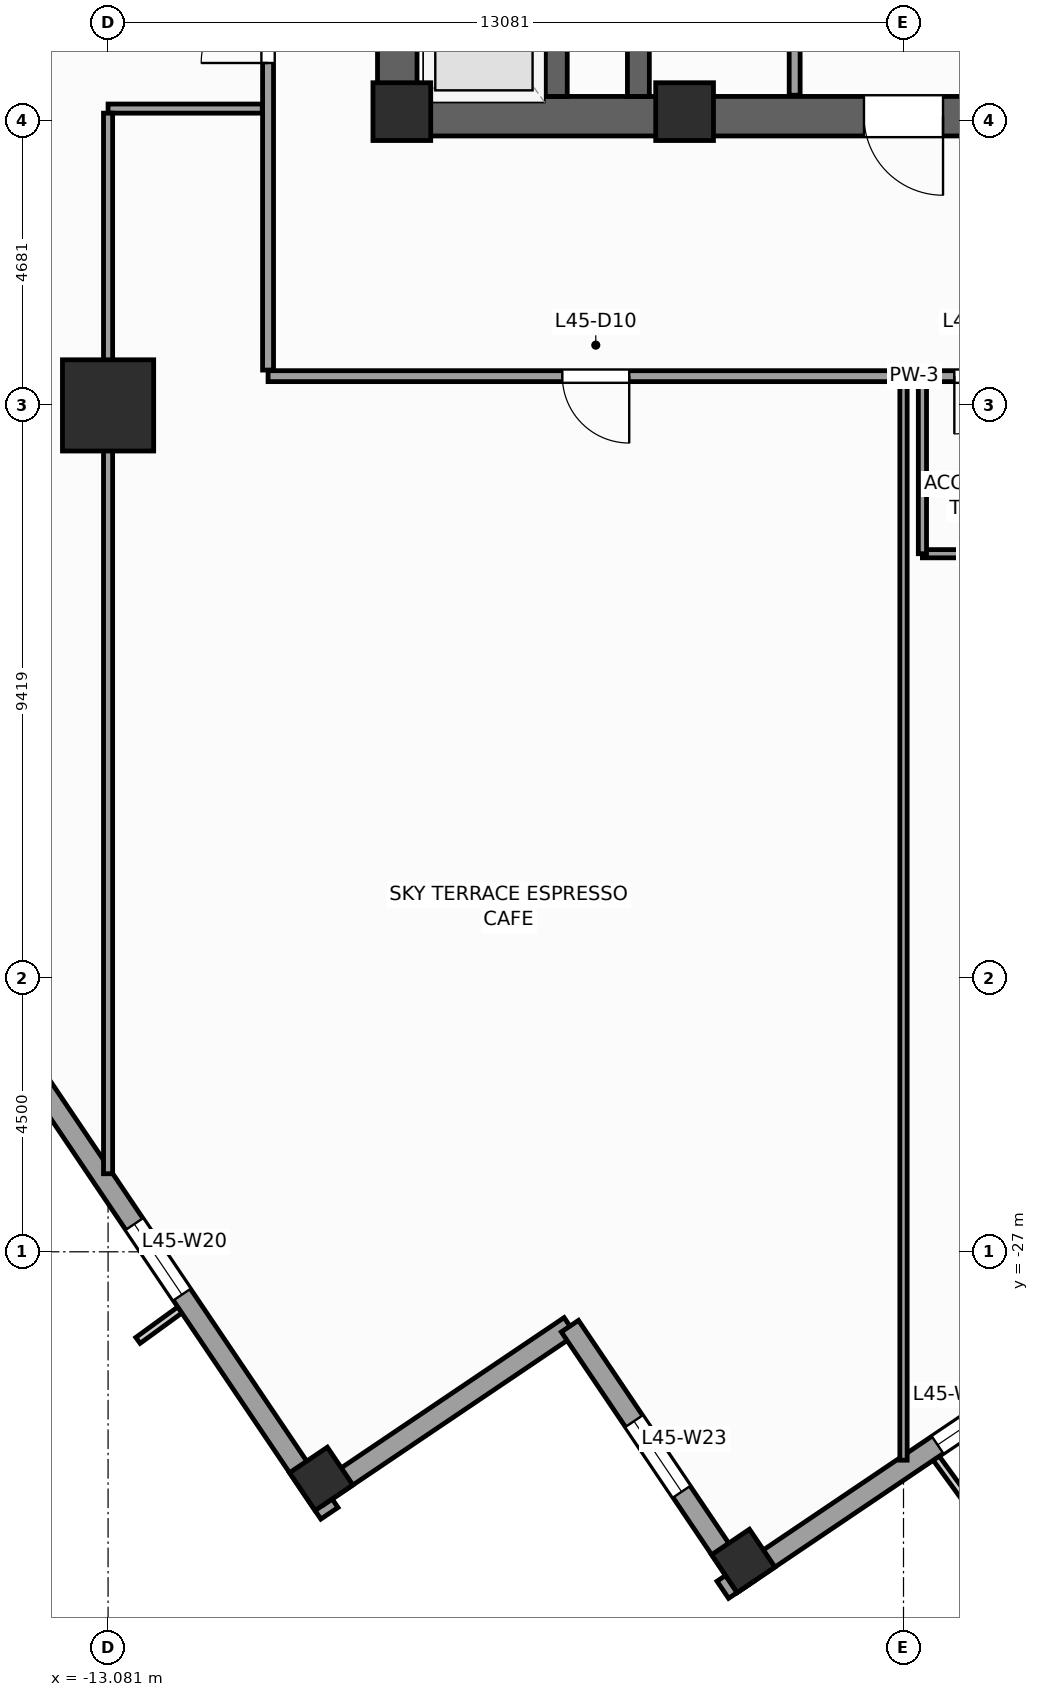
"""IFC4 building model, lengths in metres.
Left out: names, types, materials, properties, quantities, classifications, styles, units other than length and angle.
Written with IfcOpenShell. Run it as: python <this file> out.ifc"""

import sys

from ifc_helpers import new_model, si_unit, direction, frame, frame_2d, origin, origin_2d, place, context, subcontext, project, spatial, rectangle, extrude, source, transform, mapped, element, fill, save


model = new_model("IFC4")
c1 = context("Model", 3, precision=1e-05, world=origin(), true_north=direction((0.0, 1.0)))
c2 = subcontext(c1, "Body", "Model", "MODEL_VIEW")
j1 = project(units=[si_unit("LENGTHUNIT", "METRE"), si_unit("PLANEANGLEUNIT", "RADIAN")], contexts=[c1])
p1 = place(None, origin())
s1 = spatial("IfcSite", under=j1, at=p1, CompositionType="ELEMENT")
p2 = place(p1, origin())
s2 = spatial("IfcBuilding", under=s1, at=p2, CompositionType="ELEMENT")
p3 = place(p2, frame((0.0, 0.0, 188.4)))
s3 = spatial("IfcBuildingStorey", under=s2, at=p3, CompositionType="ELEMENT", Elevation=188.4)
p4 = place(p3, frame((-8.65, -8.325, 0.0), z_axis=(0.0, 0.0, 1.0), x_axis=(1.0, 0.0, 0.0)))
e1 = element("IfcWall", 1, at=p4, inside=s3, PredefinedType="SHEAR", context=c2, shape_type="SweptSolid", body=[
    extrude(rectangle(XDim=17.3, YDim=0.65, at=frame_2d((8.65, 0.0))), origin(), (0.0, 0.0, 1.0), 4.0),
])
p5 = place(p4, frame((8.0, 0.0, 0.0)))
e2 = element("IfcOpeningElement", 2, at=p5, cuts=e1, PredefinedType="OPENING", context=c2, shape_type="SweptSolid", body=[
    extrude(rectangle(XDim=1.3, YDim=2.2, at=frame_2d((0.65, 1.1))), frame((0.0, 0.335, 0.0), z_axis=(0.0, -1.0, 0.0), x_axis=(1.0, 0.0, 0.0)), (0.0, 0.0, 1.0), 0.67),
])
p6 = place(p3, frame((-8.325, -8.0, 0.0), z_axis=(0.0, 0.0, 1.0), x_axis=(0.0, 1.0, 0.0)))
e3 = element("IfcWall", 3, at=p6, inside=s3, PredefinedType="SHEAR", context=c2, shape_type="SweptSolid", body=[
    extrude(rectangle(XDim=16.0, YDim=0.65, at=frame_2d((8.0, 0.0))), origin(), (0.0, 0.0, 1.0), 4.0),
])
p7 = place(p6, frame((4.69, 0.0, 0.0)))
e4 = element("IfcOpeningElement", 4, at=p7, cuts=e3, PredefinedType="OPENING", context=c2, shape_type="SweptSolid", body=[
    extrude(rectangle(XDim=1.3, YDim=2.2, at=frame_2d((0.65, 1.1))), frame((0.0, 0.335, 0.0), z_axis=(0.0, -1.0, 0.0), x_axis=(1.0, 0.0, 0.0)), (0.0, 0.0, 1.0), 0.67),
])
p8 = place(p3, frame((-4.36, -8.0, 0.0), z_axis=(0.0, 0.0, 1.0), x_axis=(0.0, 1.0, 0.0)))
e5 = element("IfcWall", 5, at=p8, inside=s3, PredefinedType="SHEAR", context=c2, shape_type="SweptSolid", body=[
    extrude(rectangle(XDim=16.0, YDim=0.36, at=frame_2d((8.0, 0.0))), origin(), (0.0, 0.0, 1.0), 4.0),
])
p9 = place(p3, frame((-5.71, -8.0, 0.0), z_axis=(0.0, 0.0, 1.0), x_axis=(0.0, 1.0, 0.0)))
e6 = element("IfcWall", 6, at=p9, inside=s3, PredefinedType="SHEAR", context=c2, shape_type="SweptSolid", body=[
    extrude(rectangle(XDim=2.54, YDim=0.36, at=frame_2d((1.27, 0.0))), origin(), (0.0, 0.0, 1.0), 4.0),
])
m1 = source(origin(), c2, "Body", "SweptSolid", [
    extrude(rectangle(XDim=0.95, YDim=0.95, at=origin_2d()), origin(), (0.0, 0.0, 1.0), 4.0),
])
for number, where, z_axis, x_axis in (
    (7, (-8.25, -8.25, 0.0), (0.0, 0.0, 1.0), (1.0, 0.0, 0.0)),
    (8, (-3.6, -8.25, 0.0), (0.0, 0.0, 1.0), (1.0, 0.0, 0.0)),
):
    element("IfcColumn", number, at=place(p3, frame(where, z_axis=z_axis, x_axis=x_axis)), inside=s3, PredefinedType="PILASTER", context=c2, shape_type="MappedRepresentation", body=[
        mapped(m1, transform((0.0, 0.0, 0.0), scale=1.0)),
    ])
m2 = source(origin(), c2, "Body", "SweptSolid", [
    extrude(rectangle(XDim=1.5, YDim=1.5, at=origin_2d()), origin(), (0.0, 0.0, 1.0), 4.0),
])
p10 = place(p3, frame((-13.081, -13.081, 0.0), z_axis=(0.0, 0.0, 1.0), x_axis=(1.0, 0.0, 0.0)))
e9 = element("IfcColumn", 9, at=p10, inside=s3, PredefinedType="COLUMN", context=c2, shape_type="MappedRepresentation", body=[
    mapped(m2, transform((0.0, 0.0, 0.0), scale=1.0)),
])
m3 = source(origin(), c2, "Body", "SweptSolid", [
    extrude(rectangle(XDim=0.75, YDim=0.75, at=origin_2d()), origin(), (0.0, 0.0, 1.0), 4.0),
])
for number, where, z_axis, x_axis in (
    (10, (-2.635, -32.083, 0.0), (0.0, 0.0, 1.0), (0.829, 0.559, 0.0)),
    (11, (-9.576, -30.734, 0.0), (0.0, 0.0, 1.0), (0.829, 0.559, 0.0)),
):
    element("IfcColumn", number, at=place(p3, frame(where, z_axis=z_axis, x_axis=x_axis)), inside=s3, PredefinedType="COLUMN", context=c2, shape_type="MappedRepresentation", body=[
        mapped(m3, transform((0.0, 0.0, 0.0), scale=1.0)),
    ])
p11 = place(p3, frame((-2.972, -32.558, 0.0), z_axis=(0.0, 0.0, 1.0), x_axis=(0.829036218961, 0.559194910251, 0.0)))
e12 = element("IfcWall", 12, at=p11, inside=s3, PredefinedType="STANDARD", context=c2, shape_type="SweptSolid", body=[
    extrude(rectangle(XDim=41.34, YDim=0.34, at=frame_2d((20.67, 0.0))), origin(), (0.0, 0.0, 1.0), 3.04),
])
p12 = place(p11, frame((14.545, 0.0, 0.0)))
e13 = element("IfcOpeningElement", 13, at=p12, cuts=e12, PredefinedType="OPENING", context=c2, shape_type="SweptSolid", body=[
    extrude(rectangle(XDim=1.05, YDim=2.25, at=frame_2d((0.525, 1.125))), frame((0.0, 0.18, 0.0), z_axis=(0.0, -1.0, 0.0), x_axis=(1.0, 0.0, 0.0)), (0.0, 0.0, 1.0), 0.36),
])
p13 = place(p11, frame((4.261, 0.0, 0.56)))
e14 = element("IfcOpeningElement", 14, at=p13, cuts=e12, PredefinedType="OPENING", context=c2, shape_type="SweptSolid", body=[
    extrude(rectangle(XDim=1.4, YDim=2.4, at=frame_2d((0.7, 1.2))), frame((0.0, 0.18, 0.0), z_axis=(0.0, -1.0, 0.0), x_axis=(1.0, 0.0, 0.0)), (0.0, 0.0, 1.0), 0.36),
])
p14 = place(p11, frame((11.064, 0.0, 0.61)))
e15 = element("IfcOpeningElement", 15, at=p14, cuts=e12, PredefinedType="OPENING", context=c2, shape_type="SweptSolid", body=[
    extrude(rectangle(XDim=1.85, YDim=2.35, at=frame_2d((0.925, 1.175))), frame((0.0, 0.18, 0.0), z_axis=(0.0, -1.0, 0.0), x_axis=(1.0, 0.0, 0.0)), (0.0, 0.0, 1.0), 0.36),
])
p15 = place(p11, frame((18.168, 0.0, 0.61)))
e16 = element("IfcOpeningElement", 16, at=p15, cuts=e12, PredefinedType="OPENING", context=c2, shape_type="SweptSolid", body=[
    extrude(rectangle(XDim=1.85, YDim=2.35, at=frame_2d((0.925, 1.175))), frame((0.0, 0.18, 0.0), z_axis=(0.0, -1.0, 0.0), x_axis=(1.0, 0.0, 0.0)), (0.0, 0.0, 1.0), 0.36),
])
p16 = place(p11, frame((27.186, 0.0, 0.61)))
e17 = element("IfcOpeningElement", 17, at=p16, cuts=e12, PredefinedType="OPENING", context=c2, shape_type="SweptSolid", body=[
    extrude(rectangle(XDim=1.85, YDim=2.35, at=frame_2d((0.925, 1.175))), frame((0.0, 0.18, 0.0), z_axis=(0.0, -1.0, 0.0), x_axis=(1.0, 0.0, 0.0)), (0.0, 0.0, 1.0), 0.36),
])
p17 = place(p11, frame((34.852, 0.0, 0.56)))
e18 = element("IfcOpeningElement", 18, at=p17, cuts=e12, PredefinedType="OPENING", context=c2, shape_type="SweptSolid", body=[
    extrude(rectangle(XDim=1.4, YDim=2.4, at=frame_2d((0.7, 1.2))), frame((0.0, 0.18, 0.0), z_axis=(0.0, -1.0, 0.0), x_axis=(1.0, 0.0, 0.0)), (0.0, 0.0, 1.0), 0.36),
])
p18 = place(p3, frame((-32.558, 2.972, 0.0), z_axis=(0.0, 0.0, 1.0), x_axis=(0.559194910251, -0.829036218961, 0.0)))
e19 = element("IfcWall", 19, at=p18, inside=s3, PredefinedType="STANDARD", context=c2, shape_type="SweptSolid", body=[
    extrude(rectangle(XDim=41.34, YDim=0.34, at=frame_2d((20.67, 0.0))), origin(), (0.0, 0.0, 1.0), 3.04),
])
p19 = place(p18, frame((4.261, 0.0, 0.56)))
e20 = element("IfcOpeningElement", 20, at=p19, cuts=e19, PredefinedType="OPENING", context=c2, shape_type="SweptSolid", body=[
    extrude(rectangle(XDim=1.4, YDim=2.4, at=frame_2d((0.7, 1.2))), frame((0.0, 0.18, 0.0), z_axis=(0.0, -1.0, 0.0), x_axis=(1.0, 0.0, 0.0)), (0.0, 0.0, 1.0), 0.36),
])
p20 = place(p18, frame((11.064, 0.0, 0.61)))
e21 = element("IfcOpeningElement", 21, at=p20, cuts=e19, PredefinedType="OPENING", context=c2, shape_type="SweptSolid", body=[
    extrude(rectangle(XDim=1.85, YDim=2.35, at=frame_2d((0.925, 1.175))), frame((0.0, 0.18, 0.0), z_axis=(0.0, -1.0, 0.0), x_axis=(1.0, 0.0, 0.0)), (0.0, 0.0, 1.0), 0.36),
])
p21 = place(p18, frame((18.168, 0.0, 0.61)))
e22 = element("IfcOpeningElement", 22, at=p21, cuts=e19, PredefinedType="OPENING", context=c2, shape_type="SweptSolid", body=[
    extrude(rectangle(XDim=1.85, YDim=2.35, at=frame_2d((0.925, 1.175))), frame((0.0, 0.18, 0.0), z_axis=(0.0, -1.0, 0.0), x_axis=(1.0, 0.0, 0.0)), (0.0, 0.0, 1.0), 0.36),
])
p22 = place(p18, frame((27.186, 0.0, 0.61)))
e23 = element("IfcOpeningElement", 23, at=p22, cuts=e19, PredefinedType="OPENING", context=c2, shape_type="SweptSolid", body=[
    extrude(rectangle(XDim=1.85, YDim=2.35, at=frame_2d((0.925, 1.175))), frame((0.0, 0.18, 0.0), z_axis=(0.0, -1.0, 0.0), x_axis=(1.0, 0.0, 0.0)), (0.0, 0.0, 1.0), 0.36),
])
p23 = place(p18, frame((35.602, 0.0, 0.56)))
e24 = element("IfcOpeningElement", 24, at=p23, cuts=e19, PredefinedType="OPENING", context=c2, shape_type="SweptSolid", body=[
    extrude(rectangle(XDim=1.4, YDim=2.4, at=frame_2d((0.7, 1.2))), frame((0.0, 0.18, 0.0), z_axis=(0.0, -1.0, 0.0), x_axis=(1.0, 0.0, 0.0)), (0.0, 0.0, 1.0), 0.36),
])
p24 = place(p3, frame((-9.631, -31.019, 0.0), z_axis=(0.0, 0.0, 1.0), x_axis=(0.829025804298, 0.559210350234, 0.0)))
e25 = element("IfcWall", 25, at=p24, inside=s3, PredefinedType="STANDARD", context=c2, shape_type="SweptSolid", body=[
    extrude(rectangle(XDim=5.0, YDim=0.34, at=frame_2d((2.5, 0.0))), origin(), (0.0, 0.0, 1.0), 3.74),
])
p25 = place(p3, frame((-5.486, -28.223, 0.0), z_axis=(0.0, 0.0, 1.0), x_axis=(0.559171107879, -0.82905227345, 0.0)))
e26 = element("IfcWall", 26, at=p25, inside=s3, PredefinedType="STANDARD", context=c2, shape_type="SweptSolid", body=[
    extrude(rectangle(XDim=5.17, YDim=0.34, at=frame_2d((2.585, 0.0))), origin(), (0.0, 0.0, 1.0), 3.04),
])
p26 = place(p25, frame((1.885, 0.0, 0.56)))
e27 = element("IfcOpeningElement", 27, at=p26, cuts=e26, PredefinedType="OPENING", context=c2, shape_type="SweptSolid", body=[
    extrude(rectangle(XDim=1.4, YDim=2.4, at=frame_2d((0.7, 1.2))), frame((0.0, 0.18, 0.0), z_axis=(0.0, -1.0, 0.0), x_axis=(1.0, 0.0, 0.0)), (0.0, 0.0, 1.0), 0.36),
])
p27 = place(p3, frame((-1.79, -7.98, 0.0), z_axis=(0.0, 0.0, 1.0), x_axis=(0.0, 1.0, 0.0)))
e28 = element("IfcWall", 28, at=p27, inside=s3, PredefinedType="PARTITIONING", context=c2, shape_type="SweptSolid", body=[
    extrude(rectangle(XDim=12.38, YDim=0.18, at=frame_2d((6.19, 0.0))), origin(), (0.0, 0.0, 1.0), 3.74),
])
p28 = place(p27, frame((4.6, 0.0, 0.0)))
e29 = element("IfcOpeningElement", 29, at=p28, cuts=e28, PredefinedType="OPENING", context=c2, shape_type="SweptSolid", body=[
    extrude(rectangle(XDim=1.1, YDim=2.2, at=frame_2d((0.55, 1.1))), frame((0.0, 0.1, 0.0), z_axis=(0.0, -1.0, 0.0), x_axis=(1.0, 0.0, 0.0)), (0.0, 0.0, 1.0), 0.2),
])
p29 = place(p27, frame((6.66, 0.0, 0.0)))
e30 = element("IfcOpeningElement", 30, at=p29, cuts=e28, PredefinedType="OPENING", context=c2, shape_type="SweptSolid", body=[
    extrude(rectangle(XDim=1.1, YDim=2.2, at=frame_2d((0.55, 1.1))), frame((0.0, 0.1, 0.0), z_axis=(0.0, -1.0, 0.0), x_axis=(1.0, 0.0, 0.0)), (0.0, 0.0, 1.0), 0.2),
])
p30 = place(p27, frame((1.4, 0.0, 0.0)))
e31 = element("IfcOpeningElement", 31, at=p30, cuts=e28, PredefinedType="OPENING", context=c2, shape_type="SweptSolid", body=[
    extrude(rectangle(XDim=1.15, YDim=2.25, at=frame_2d((0.575, 1.125))), frame((0.0, 0.1, 0.0), z_axis=(0.0, -1.0, 0.0), x_axis=(1.0, 0.0, 0.0)), (0.0, 0.0, 1.0), 0.2),
])
p31 = place(p3, frame((-10.45, -12.6, 0.0), z_axis=(0.0, 0.0, 1.0), x_axis=(1.0, 0.0, 0.0)))
e32 = element("IfcWall", 32, at=p31, inside=s3, PredefinedType="PARTITIONING", context=c2, shape_type="SweptSolid", body=[
    extrude(rectangle(XDim=22.0, YDim=0.18, at=frame_2d((11.0, 0.0))), origin(), (0.0, 0.0, 1.0), 3.74),
])
p32 = place(p31, frame((11.286, 0.0, 0.0)))
e33 = element("IfcOpeningElement", 33, at=p32, cuts=e32, PredefinedType="OPENING", context=c2, shape_type="SweptSolid", body=[
    extrude(rectangle(XDim=0.95, YDim=2.1, at=frame_2d((0.475, 1.05))), frame((0.0, 0.1, 0.0), z_axis=(0.0, -1.0, 0.0), x_axis=(1.0, 0.0, 0.0)), (0.0, 0.0, 1.0), 0.2),
])
p33 = place(p31, frame((4.839, 0.0, 0.0)))
e34 = element("IfcOpeningElement", 34, at=p33, cuts=e32, PredefinedType="OPENING", context=c2, shape_type="SweptSolid", body=[
    extrude(rectangle(XDim=1.1, YDim=2.2, at=frame_2d((0.55, 1.1))), frame((0.0, 0.1, 0.0), z_axis=(0.0, -1.0, 0.0), x_axis=(1.0, 0.0, 0.0)), (0.0, 0.0, 1.0), 0.2),
])
p34 = place(p31, frame((16.66, 0.0, 0.0)))
e35 = element("IfcOpeningElement", 35, at=p34, cuts=e32, PredefinedType="OPENING", context=c2, shape_type="SweptSolid", body=[
    extrude(rectangle(XDim=1.1, YDim=2.2, at=frame_2d((0.55, 1.1))), frame((0.0, 0.1, 0.0), z_axis=(0.0, -1.0, 0.0), x_axis=(1.0, 0.0, 0.0)), (0.0, 0.0, 1.0), 0.2),
])
p35 = place(p3, frame((-10.45, -12.5, 0.0), z_axis=(0.0, 0.0, 1.0), x_axis=(0.0, 1.0, 0.0)))
e36 = element("IfcWall", 36, at=p35, inside=s3, PredefinedType="PARTITIONING", context=c2, shape_type="SweptSolid", body=[
    extrude(rectangle(XDim=16.3, YDim=0.18, at=frame_2d((8.15, 0.0))), origin(), (0.0, 0.0, 1.0), 3.74),
])
p36 = place(p35, frame((14.26, 0.0, 0.0)))
e37 = element("IfcOpeningElement", 37, at=p36, cuts=e36, PredefinedType="OPENING", context=c2, shape_type="SweptSolid", body=[
    extrude(rectangle(XDim=1.1, YDim=2.2, at=frame_2d((0.55, 1.1))), frame((0.0, 0.1, 0.0), z_axis=(0.0, -1.0, 0.0), x_axis=(1.0, 0.0, 0.0)), (0.0, 0.0, 1.0), 0.2),
])
p37 = place(p35, frame((11.225, 0.0, 0.0)))
e38 = element("IfcOpeningElement", 38, at=p37, cuts=e36, PredefinedType="OPENING", context=c2, shape_type="SweptSolid", body=[
    extrude(rectangle(XDim=1.1, YDim=2.2, at=frame_2d((0.55, 1.1))), frame((0.0, 0.1, 0.0), z_axis=(0.0, -1.0, 0.0), x_axis=(1.0, 0.0, 0.0)), (0.0, 0.0, 1.0), 0.2),
])
p38 = place(p35, frame((7.85, 0.0, 0.0)))
e39 = element("IfcOpeningElement", 39, at=p38, cuts=e36, PredefinedType="OPENING", context=c2, shape_type="SweptSolid", body=[
    extrude(rectangle(XDim=1.1, YDim=2.2, at=frame_2d((0.55, 1.1))), frame((0.0, 0.1, 0.0), z_axis=(0.0, -1.0, 0.0), x_axis=(1.0, 0.0, 0.0)), (0.0, 0.0, 1.0), 0.2),
])
p39 = place(p35, frame((5.05, 0.0, 0.0)))
e40 = element("IfcOpeningElement", 40, at=p39, cuts=e36, PredefinedType="OPENING", context=c2, shape_type="SweptSolid", body=[
    extrude(rectangle(XDim=1.1, YDim=2.2, at=frame_2d((0.55, 1.1))), frame((0.0, 0.1, 0.0), z_axis=(0.0, -1.0, 0.0), x_axis=(1.0, 0.0, 0.0)), (0.0, 0.0, 1.0), 0.2),
])
p40 = place(p3, frame((-10.545, -8.2, 0.0), z_axis=(0.0, 0.0, 1.0), x_axis=(-1.0, 0.0, 0.0)))
e41 = element("IfcWall", 41, at=p40, inside=s3, PredefinedType="PARTITIONING", context=c2, shape_type="SweptSolid", body=[
    extrude(rectangle(XDim=2.536, YDim=0.15, at=frame_2d((1.268, 0.0))), origin(), (0.0, 0.0, 1.0), 3.74),
])
p41 = place(p3, frame((-13.081, -8.275, 0.0), z_axis=(0.0, 0.0, 1.0), x_axis=(0.0, -1.0, 0.0)))
e42 = element("IfcWall", 42, at=p41, inside=s3, PredefinedType="PARTITIONING", context=c2, shape_type="SweptSolid", body=[
    extrude(rectangle(XDim=17.441, YDim=0.15, at=frame_2d((8.721, 0.0))), origin(), (0.0, 0.0, 1.0), 2.84),
])
p42 = place(p3, frame((0.0, -30.427, 0.0), z_axis=(0.0, 0.0, 1.0), x_axis=(0.0, 1.0, 0.0)))
e43 = element("IfcWall", 43, at=p42, inside=s3, PredefinedType="PARTITIONING", context=c2, shape_type="SweptSolid", body=[
    extrude(rectangle(XDim=17.732, YDim=0.12, at=frame_2d((8.866, 0.0))), origin(), (0.0, 0.0, 1.0), 3.74),
])
p43 = place(p3, frame((0.311, -15.52, 0.0), z_axis=(0.0, 0.0, 1.0), x_axis=(1.0, 0.0, 0.0)))
e44 = element("IfcWall", 44, at=p43, inside=s3, PredefinedType="PARTITIONING", context=c2, shape_type="SweptSolid", body=[
    extrude(rectangle(XDim=2.0, YDim=0.135, at=frame_2d((1.0, 0.0))), origin(), (0.0, 0.0, 1.0), 3.74),
])
p44 = place(p3, frame((0.311, -15.52, 0.0), z_axis=(0.0, 0.0, 1.0), x_axis=(0.0, 1.0, 0.0)))
e45 = element("IfcWall", 45, at=p44, inside=s3, PredefinedType="PARTITIONING", context=c2, shape_type="SweptSolid", body=[
    extrude(rectangle(XDim=2.9, YDim=0.135, at=frame_2d((1.45, 0.0))), origin(), (0.0, 0.0, 1.0), 3.74),
])
m4 = source(origin(), c2, "Body", "SweptSolid", [
    extrude(rectangle(XDim=1.4, YDim=2.4, at=frame_2d((0.7, 1.2))), frame((0.0, 0.03, 0.0), z_axis=(0.0, -1.0, 0.0), x_axis=(1.0, 0.0, 0.0)), (0.0, 0.0, 1.0), 0.06),
])
p45 = place(p13, origin())
e46 = element("IfcWindow", 46, at=p45, inside=s3, PartitioningType="SINGLE_PANEL", PredefinedType="WINDOW", context=c2, shape_type="MappedRepresentation", body=[
    mapped(m4, transform((0.0, 0.0, 0.0), scale=1.0)),
])
fill(e14, e46)
p46 = place(p23, origin())
e47 = element("IfcWindow", 47, at=p46, inside=s3, PartitioningType="SINGLE_PANEL", PredefinedType="WINDOW", context=c2, shape_type="MappedRepresentation", body=[
    mapped(m4, transform((0.0, 0.0, 0.0), scale=1.0)),
])
fill(e24, e47)
p47 = place(p26, origin())
e48 = element("IfcWindow", 48, at=p47, inside=s3, PartitioningType="SINGLE_PANEL", PredefinedType="WINDOW", context=c2, shape_type="MappedRepresentation", body=[
    mapped(m4, transform((0.0, 0.0, 0.0), scale=1.0)),
])
fill(e27, e48)
m5 = source(origin(), c2, "Body", "SweptSolid", [
    extrude(rectangle(XDim=1.3, YDim=2.2, at=frame_2d((0.65, 1.1))), frame((0.0, 0.025, 0.0), z_axis=(0.0, -1.0, 0.0), x_axis=(1.0, 0.0, 0.0)), (0.0, 0.0, 1.0), 0.05),
])
p48 = place(p5, frame((1.3, 0.0, 0.0), z_axis=(0.0, 0.0, 1.0), x_axis=(-1.0, 0.0, 0.0)))
e49 = element("IfcDoor", 49, at=p48, inside=s3, OperationType="SINGLE_SWING_RIGHT", PredefinedType="DOOR", context=c2, shape_type="MappedRepresentation", body=[
    mapped(m5, transform((0.0, 0.0, 0.0), scale=1.0)),
])
fill(e2, e49)
m6 = source(origin(), c2, "Body", "SweptSolid", [
    extrude(rectangle(XDim=0.95, YDim=2.1, at=frame_2d((0.475, 1.05))), frame((0.0, 0.025, 0.0), z_axis=(0.0, -1.0, 0.0), x_axis=(1.0, 0.0, 0.0)), (0.0, 0.0, 1.0), 0.05),
])
p49 = place(p32, frame((0.95, 0.0, 0.0), z_axis=(0.0, 0.0, 1.0), x_axis=(-1.0, 0.0, 0.0)))
e50 = element("IfcDoor", 50, at=p49, inside=s3, OperationType="SINGLE_SWING_LEFT", PredefinedType="DOOR", context=c2, shape_type="MappedRepresentation", body=[
    mapped(m6, transform((0.0, 0.0, 0.0), scale=1.0)),
])
fill(e33, e50)
m7 = source(origin(), c2, "Body", "SweptSolid", [
    extrude(rectangle(XDim=1.1, YDim=2.2, at=frame_2d((0.55, 1.1))), frame((0.0, 0.025, 0.0), z_axis=(0.0, -1.0, 0.0), x_axis=(1.0, 0.0, 0.0)), (0.0, 0.0, 1.0), 0.05),
])
p50 = place(p39, origin())
e51 = element("IfcDoor", 51, at=p50, inside=s3, OperationType="SINGLE_SWING_LEFT", PredefinedType="DOOR", context=c2, shape_type="MappedRepresentation", body=[
    mapped(m7, transform((0.0, 0.0, 0.0), scale=1.0)),
])
fill(e40, e51)
p51 = place(p33, frame((1.1, 0.0, 0.0), z_axis=(0.0, 0.0, 1.0), x_axis=(-1.0, 0.0, 0.0)))
e52 = element("IfcDoor", 52, at=p51, inside=s3, OperationType="SINGLE_SWING_RIGHT", PredefinedType="DOOR", context=c2, shape_type="MappedRepresentation", body=[
    mapped(m7, transform((0.0, 0.0, 0.0), scale=1.0)),
])
fill(e34, e52)
save(model, sys.argv[1])
